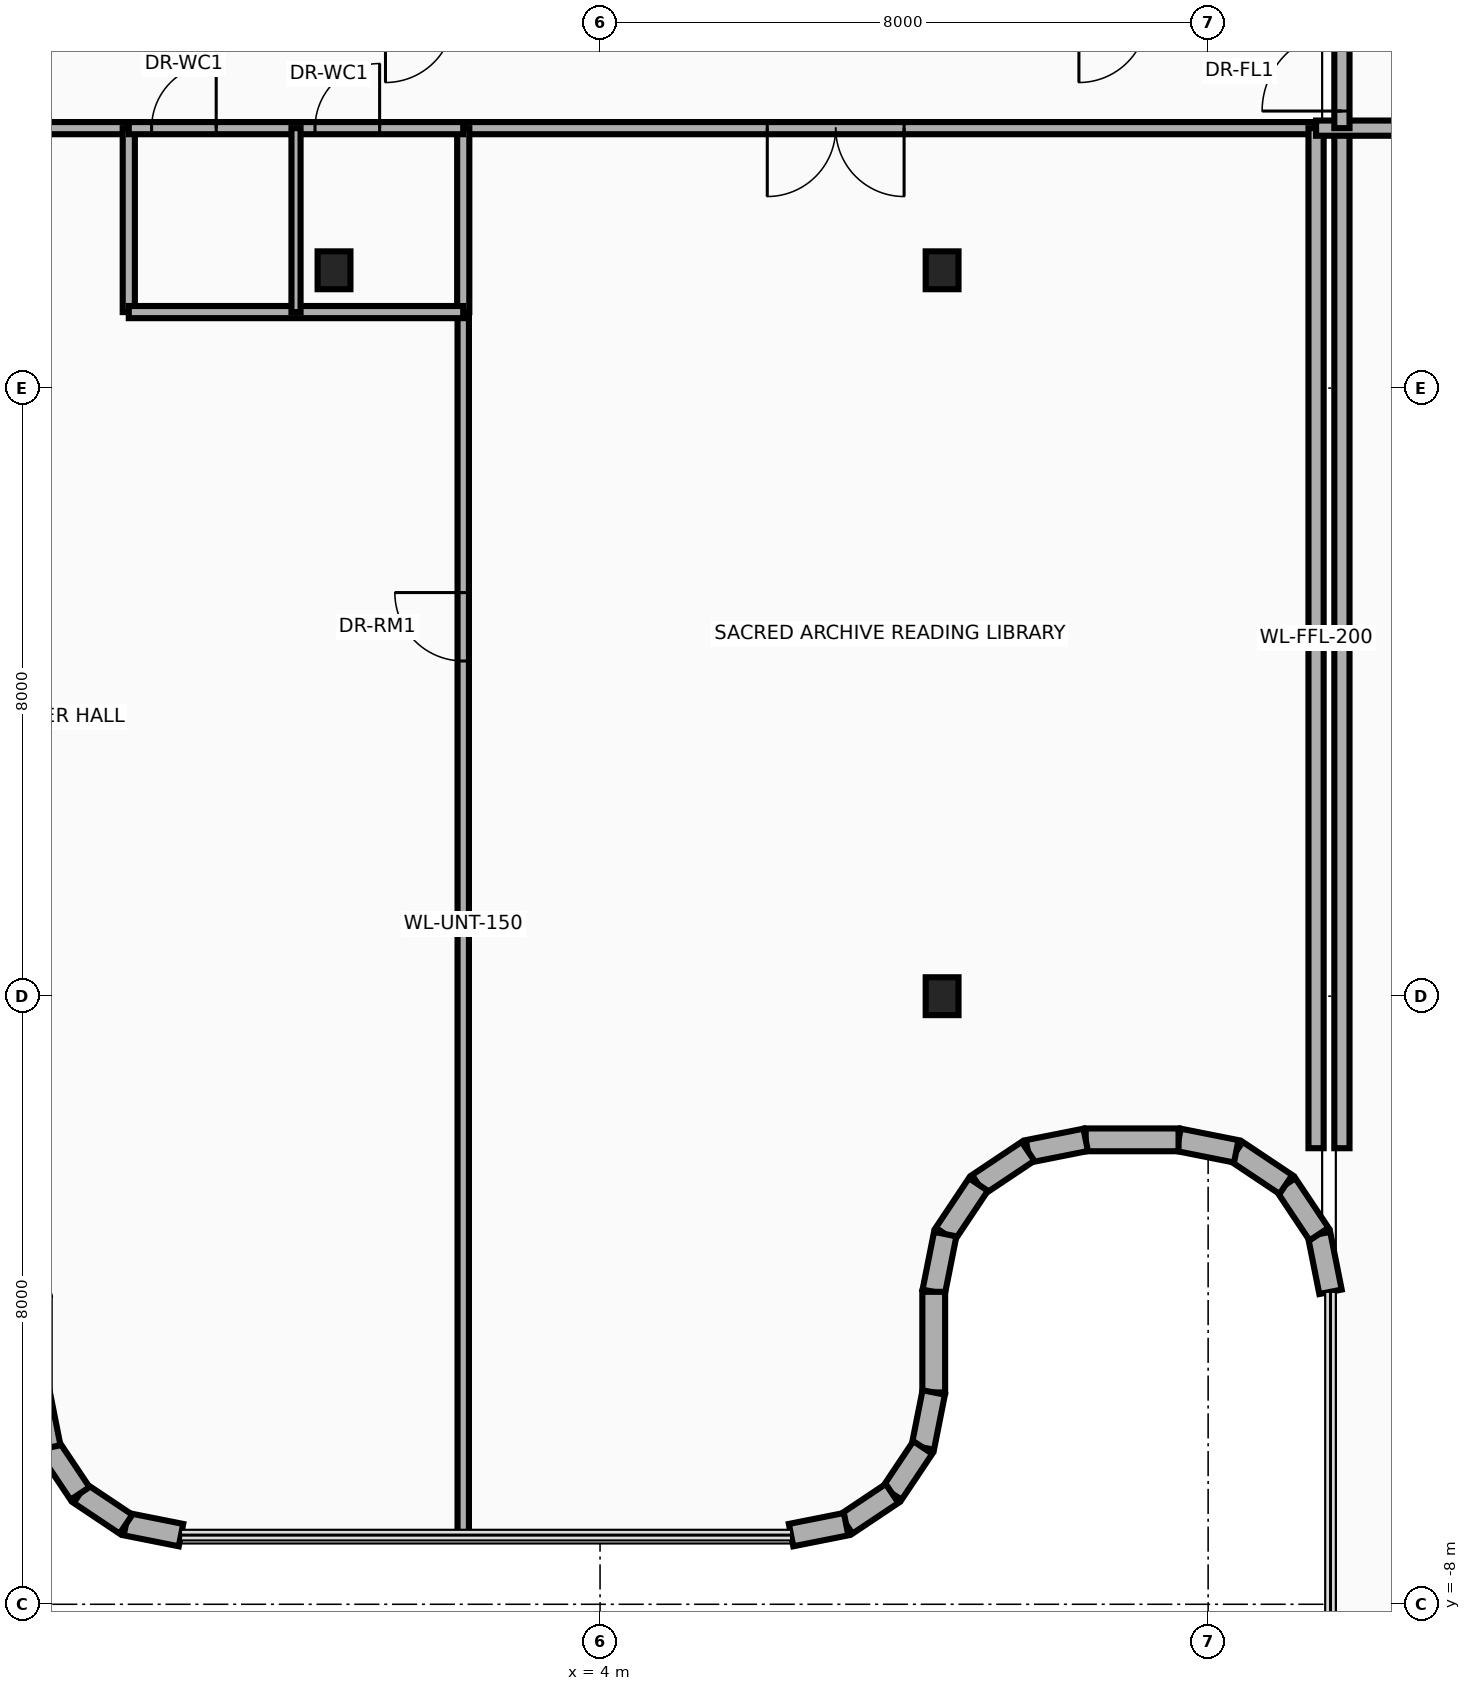
"""IFC4 building model, lengths in metres.
Left out: names, types, materials, properties, quantities, classifications, styles, units other than length and angle.
Written with IfcOpenShell. Run it as: python <this file> out.ifc"""

import sys

from ifc_helpers import new_model, si_unit, direction, frame, frame_2d, origin, origin_2d, place, context, subcontext, project, spatial, rectangle, i_section, extrude, source, transform, mapped, element, fill, save


model = new_model("IFC4")
c1 = context("Model", 3, precision=1e-05, world=origin(), true_north=direction((0.0, 1.0)))
c2 = subcontext(c1, "Body", "Model", "MODEL_VIEW")
j1 = project(units=[si_unit("LENGTHUNIT", "METRE"), si_unit("PLANEANGLEUNIT", "RADIAN")], contexts=[c1])
p1 = place(None, origin())
s1 = spatial("IfcSite", under=j1, at=p1, CompositionType="ELEMENT")
p2 = place(p1, origin())
s2 = spatial("IfcBuilding", under=s1, at=p2, CompositionType="ELEMENT")
p3 = place(p2, frame((0.0, 0.0, 192.35)))
s3 = spatial("IfcBuildingStorey", under=s2, at=p3, CompositionType="ELEMENT", Elevation=192.35)
m1 = source(origin(), c2, "Body", "SweptSolid", [
    extrude(i_section(OverallWidth=0.432, OverallDepth=0.498, WebThickness=0.056, FlangeThickness=0.089, at=origin_2d()), origin(), (0.0, 0.0, 1.0), 3.95),
])
for number, where, z_axis, x_axis in (
    (1, (8.5, 0.0, 0.0), (0.0, 0.0, 1.0), (1.0, 0.0, 0.0)),
    (2, (8.5, 9.55, 0.0), (0.0, 0.0, 1.0), (1.0, 0.0, 0.0)),
    (3, (0.5, 9.55, 0.0), (0.0, 0.0, 1.0), (1.0, 0.0, 0.0)),
):
    element("IfcColumn", number, at=place(p3, frame(where, z_axis=z_axis, x_axis=x_axis)), inside=s3, PredefinedType="COLUMN", context=c2, shape_type="MappedRepresentation", body=[
        mapped(m1, transform((0.0, 0.0, 0.0), x_axis=(1.0, 0.0, 0.0), y_axis=(0.0, 1.0, 0.0), z_axis=(0.0, 0.0, 1.0), scale=1.0)),
    ])
p4 = place(p3, frame((13.61, -3.889, 0.0), z_axis=(0.0, 0.0, 1.0), x_axis=(-0.195206365311, 0.98076219082, 0.0)))
e4 = element("IfcWall", 4, at=p4, inside=s3, PredefinedType="SOLIDWALL", context=c2, shape_type="SweptSolid", body=[
    extrude(rectangle(XDim=0.774, YDim=0.3, at=frame_2d((0.387, 0.0))), origin(), (0.0, 0.0, 1.0), 3.71),
])
for number, where, z_axis, x_axis in (
    (5, (13.459, -3.13, 0.0), (0.0, 0.0, 1.0), (-0.556, 0.831, 0.0)),
    (6, (13.023, -2.477, 0.0), (0.0, 0.0, 1.0), (-0.831, 0.556, 0.0)),
):
    element("IfcWall", number, at=place(p3, frame(where, z_axis=z_axis, x_axis=x_axis)), inside=s3, PredefinedType="SOLIDWALL", context=c2, shape_type="SweptSolid", body=[
        extrude(rectangle(XDim=0.785, YDim=0.3, at=frame_2d((0.393, 0.0))), origin(), (0.0, 0.0, 1.0), 3.71),
    ])
p5 = place(p3, frame((12.37, -2.041, 0.0), z_axis=(0.0, 0.0, 1.0), x_axis=(-0.98076219082, 0.195206365311, 0.0)))
e7 = element("IfcWall", 7, at=p5, inside=s3, PredefinedType="SOLIDWALL", context=c2, shape_type="SweptSolid", body=[
    extrude(rectangle(XDim=0.774, YDim=0.3, at=frame_2d((0.387, 0.0))), origin(), (0.0, 0.0, 1.0), 3.71),
])
p6 = place(p3, frame((11.611, -1.89, 0.0), z_axis=(0.0, 0.0, 1.0), x_axis=(-1.0, 0.0, 0.0)))
e8 = element("IfcWall", 8, at=p6, inside=s3, PredefinedType="SOLIDWALL", context=c2, shape_type="SweptSolid", body=[
    extrude(rectangle(XDim=1.222, YDim=0.3, at=frame_2d((0.611, 0.0))), origin(), (0.0, 0.0, 1.0), 3.71),
])
p7 = place(p3, frame((10.389, -1.89, 0.0), z_axis=(0.0, 0.0, 1.0), x_axis=(-0.98076219082, -0.195206365311, 0.0)))
e9 = element("IfcWall", 9, at=p7, inside=s3, PredefinedType="SOLIDWALL", context=c2, shape_type="SweptSolid", body=[
    extrude(rectangle(XDim=0.774, YDim=0.3, at=frame_2d((0.387, 0.0))), origin(), (0.0, 0.0, 1.0), 3.71),
])
for number, where, z_axis, x_axis in (
    (10, (9.63, -2.041, 0.0), (0.0, 0.0, 1.0), (-0.831, -0.556, 0.0)),
    (11, (8.977, -2.477, 0.0), (0.0, 0.0, 1.0), (-0.556, -0.831, 0.0)),
):
    element("IfcWall", number, at=place(p3, frame(where, z_axis=z_axis, x_axis=x_axis)), inside=s3, PredefinedType="SOLIDWALL", context=c2, shape_type="SweptSolid", body=[
        extrude(rectangle(XDim=0.785, YDim=0.3, at=frame_2d((0.393, 0.0))), origin(), (0.0, 0.0, 1.0), 2.695),
    ])
p8 = place(p3, frame((8.541, -3.13, 0.0), z_axis=(0.0, 0.0, 1.0), x_axis=(-0.195206365311, -0.98076219082, 0.0)))
e12 = element("IfcWall", 12, at=p8, inside=s3, PredefinedType="SOLIDWALL", context=c2, shape_type="SweptSolid", body=[
    extrude(rectangle(XDim=0.774, YDim=0.3, at=frame_2d((0.387, 0.0))), origin(), (0.0, 0.0, 1.0), 2.695),
])
p9 = place(p3, frame((8.39, -3.889, 0.0), z_axis=(0.0, 0.0, 1.0), x_axis=(0.0, -1.0, 0.0)))
e13 = element("IfcWall", 13, at=p9, inside=s3, PredefinedType="SOLIDWALL", context=c2, shape_type="SweptSolid", body=[
    extrude(rectangle(XDim=1.324, YDim=0.3, at=frame_2d((0.662, 0.0))), origin(), (0.0, 0.0, 1.0), 2.695),
])
p10 = place(p3, frame((8.39, -5.213, 0.0), z_axis=(0.0, 0.0, 1.0), x_axis=(-0.194780446724, -0.980846867546, 0.0)))
e14 = element("IfcWall", 14, at=p10, inside=s3, PredefinedType="SOLIDWALL", context=c2, shape_type="SweptSolid", body=[
    extrude(rectangle(XDim=0.738, YDim=0.3, at=frame_2d((0.369, 0.0))), origin(), (0.0, 0.0, 1.0), 2.695),
])
p11 = place(p3, frame((8.246, -5.937, 0.0), z_axis=(0.0, 0.0, 1.0), x_axis=(-0.555784030735, -0.83132671747, 0.0)))
e15 = element("IfcWall", 15, at=p11, inside=s3, PredefinedType="SOLIDWALL", context=c2, shape_type="SweptSolid", body=[
    extrude(rectangle(XDim=0.728, YDim=0.3, at=frame_2d((0.364, 0.0))), origin(), (0.0, 0.0, 1.0), 2.695),
])
p12 = place(p3, frame((7.842, -6.542, 0.0), z_axis=(0.0, 0.0, 1.0), x_axis=(-0.831378135196, -0.555707113792, 0.0)))
e16 = element("IfcWall", 16, at=p12, inside=s3, PredefinedType="SOLIDWALL", context=c2, shape_type="SweptSolid", body=[
    extrude(rectangle(XDim=0.727, YDim=0.3, at=frame_2d((0.364, 0.0))), origin(), (0.0, 0.0, 1.0), 3.71),
])
for number, where, z_axis, x_axis in (
    (17, (7.237, -6.946, 0.0), (0.0, 0.0, 1.0), (-0.981, -0.195, 0.0)),
    (18, (-1.513, -7.09, 0.0), (0.0, 0.0, 1.0), (-0.981, 0.195, 0.0)),
):
    element("IfcWall", number, at=place(p3, frame(where, z_axis=z_axis, x_axis=x_axis)), inside=s3, PredefinedType="SOLIDWALL", context=c2, shape_type="SweptSolid", body=[
        extrude(rectangle(XDim=0.738, YDim=0.3, at=frame_2d((0.369, 0.0))), origin(), (0.0, 0.0, 1.0), 3.156),
    ])
p13 = place(p3, frame((-2.237, -6.946, 0.0), z_axis=(0.0, 0.0, 1.0), x_axis=(-0.831378135196, 0.555707113792, 0.0)))
e19 = element("IfcWall", 19, at=p13, inside=s3, PredefinedType="SOLIDWALL", context=c2, shape_type="SweptSolid", body=[
    extrude(rectangle(XDim=0.727, YDim=0.3, at=frame_2d((0.364, 0.0))), origin(), (0.0, 0.0, 1.0), 3.71),
])
p14 = place(p3, frame((-2.842, -6.542, 0.0), z_axis=(0.0, 0.0, 1.0), x_axis=(-0.555784030735, 0.83132671747, 0.0)))
e20 = element("IfcWall", 20, at=p14, inside=s3, PredefinedType="SOLIDWALL", context=c2, shape_type="SweptSolid", body=[
    extrude(rectangle(XDim=0.728, YDim=0.3, at=frame_2d((0.364, 0.0))), origin(), (0.0, 0.0, 1.0), 2.695),
])
p15 = place(p3, frame((-3.246, -5.937, 0.0), z_axis=(0.0, 0.0, 1.0), x_axis=(-0.194780446724, 0.980846867546, 0.0)))
e21 = element("IfcWall", 21, at=p15, inside=s3, PredefinedType="SOLIDWALL", context=c2, shape_type="SweptSolid", body=[
    extrude(rectangle(XDim=0.738, YDim=0.3, at=frame_2d((0.369, 0.0))), origin(), (0.0, 0.0, 1.0), 2.695),
])
p16 = place(p3, frame((-10.05, 11.42, 0.0), z_axis=(0.0, 0.0, 1.0), x_axis=(1.0, 0.0, 0.0)))
e22 = element("IfcWall", 22, at=p16, inside=s3, PredefinedType="PARTITIONING", context=c2, shape_type="SweptSolid", body=[
    extrude(rectangle(XDim=7.85, YDim=0.16, at=frame_2d((3.925, 0.0))), origin(), (0.0, 0.0, 1.0), 2.695),
])
p17 = place(p3, frame((2.2, 11.42, 0.0), z_axis=(0.0, 0.0, 1.0), x_axis=(1.0, 0.0, 0.0)))
e23 = element("IfcWall", 23, at=p17, inside=s3, PredefinedType="PARTITIONING", context=c2, shape_type="SweptSolid", body=[
    extrude(rectangle(XDim=11.22, YDim=0.16, at=frame_2d((5.61, 0.0))), origin(), (0.0, 0.0, 1.0), 2.695),
])
p18 = place(p17, frame((4.0, 0.0, 0.0)))
e24 = element("IfcOpeningElement", 24, at=p18, cuts=e23, PredefinedType="OPENING", context=c2, shape_type="SweptSolid", body=[
    extrude(rectangle(XDim=1.8, YDim=2.15, at=frame_2d((0.9, 1.075))), frame((0.0, 0.095, 0.0), z_axis=(0.0, -1.0, 0.0), x_axis=(1.0, 0.0, 0.0)), (0.0, 0.0, 1.0), 0.19),
])
for number, where, z_axis, x_axis in (
    (25, (13.42, -2.0, 0.0), (0.0, 0.0, 1.0), (0.0, 1.0, 0.0)),
    (26, (13.76, -2.0, 0.0), (0.0, 0.0, 1.0), (0.0, 1.0, 0.0)),
):
    element("IfcWall", number, at=place(p3, frame(where, z_axis=z_axis, x_axis=x_axis)), inside=s3, PredefinedType="PARTITIONING", context=c2, shape_type="SweptSolid", body=[
        extrude(rectangle(XDim=13.42, YDim=0.2, at=frame_2d((6.71, 0.0))), origin(), (0.0, 0.0, 1.0), 2.994),
    ])
p19 = place(p3, frame((2.2, -7.09, 0.0), z_axis=(0.0, 0.0, 1.0), x_axis=(0.0, 1.0, 0.0)))
e27 = element("IfcWall", 27, at=p19, inside=s3, PredefinedType="PARTITIONING", context=c2, shape_type="SweptSolid", body=[
    extrude(rectangle(XDim=16.09, YDim=0.15, at=frame_2d((8.045, 0.0))), origin(), (0.0, 0.0, 1.0), 2.994),
])
p20 = place(p19, frame((11.5, 0.0, 0.0)))
e28 = element("IfcOpeningElement", 28, at=p20, cuts=e27, PredefinedType="OPENING", context=c2, shape_type="SweptSolid", body=[
    extrude(rectangle(XDim=0.9, YDim=2.1, at=frame_2d((0.45, 1.05))), frame((0.0, 0.09, 0.0), z_axis=(0.0, -1.0, 0.0), x_axis=(1.0, 0.0, 0.0)), (0.0, 0.0, 1.0), 0.18),
])
for number, where, z_axis, x_axis in (
    (29, (-2.2, 9.0, 0.0), (0.0, 0.0, 1.0), (0.0, 1.0, 0.0)),
    (30, (2.2, 9.0, 0.0), (0.0, 0.0, 1.0), (0.0, 1.0, 0.0)),
):
    element("IfcWall", number, at=place(p3, frame(where, z_axis=z_axis, x_axis=x_axis)), inside=s3, PredefinedType="PARTITIONING", context=c2, shape_type="SweptSolid", body=[
        extrude(rectangle(XDim=2.42, YDim=0.16, at=frame_2d((1.21, 0.0))), origin(), (0.0, 0.0, 1.0), 2.994),
    ])
p21 = place(p3, frame((-2.2, 9.0, 0.0), z_axis=(0.0, 0.0, 1.0), x_axis=(1.0, 0.0, 0.0)))
e31 = element("IfcWall", 31, at=p21, inside=s3, PredefinedType="PARTITIONING", context=c2, shape_type="SweptSolid", body=[
    extrude(rectangle(XDim=4.4, YDim=0.16, at=frame_2d((2.2, 0.0))), origin(), (0.0, 0.0, 1.0), 3.71),
])
p22 = place(p3, frame((-2.2, 11.42, 0.0), z_axis=(0.0, 0.0, 1.0), x_axis=(1.0, 0.0, 0.0)))
e32 = element("IfcWall", 32, at=p22, inside=s3, PredefinedType="PARTITIONING", context=c2, shape_type="SweptSolid", body=[
    extrude(rectangle(XDim=4.4, YDim=0.16, at=frame_2d((2.2, 0.0))), origin(), (0.0, 0.0, 1.0), 3.156),
])
p23 = place(p22, frame((0.3, 0.0, 0.0)))
e33 = element("IfcOpeningElement", 33, at=p23, cuts=e32, PredefinedType="OPENING", context=c2, shape_type="SweptSolid", body=[
    extrude(rectangle(XDim=0.85, YDim=2.1, at=frame_2d((0.425, 1.05))), frame((0.0, 0.095, 0.0), z_axis=(0.0, -1.0, 0.0), x_axis=(1.0, 0.0, 0.0)), (0.0, 0.0, 1.0), 0.19),
])
p24 = place(p22, frame((2.45, 0.0, 0.0)))
e34 = element("IfcOpeningElement", 34, at=p24, cuts=e32, PredefinedType="OPENING", context=c2, shape_type="SweptSolid", body=[
    extrude(rectangle(XDim=0.85, YDim=2.1, at=frame_2d((0.425, 1.05))), frame((0.0, 0.095, 0.0), z_axis=(0.0, -1.0, 0.0), x_axis=(1.0, 0.0, 0.0)), (0.0, 0.0, 1.0), 0.19),
])
p25 = place(p3, frame((0.0, 9.0, 0.0), z_axis=(0.0, 0.0, 1.0), x_axis=(0.0, 1.0, 0.0)))
e35 = element("IfcWall", 35, at=p25, inside=s3, PredefinedType="PARTITIONING", context=c2, shape_type="SweptSolid", body=[
    extrude(rectangle(XDim=2.42, YDim=0.12, at=frame_2d((1.21, 0.0))), origin(), (0.0, 0.0, 1.0), 2.994),
])
p26 = place(p3, frame((13.42, 11.42, 0.0), z_axis=(0.0, 0.0, 1.0), x_axis=(1.0, 0.0, 0.0)))
e36 = element("IfcWall", 36, at=p26, inside=s3, PredefinedType="PARTITIONING", context=c2, shape_type="SweptSolid", body=[
    extrude(rectangle(XDim=1.98, YDim=0.2, at=frame_2d((0.99, 0.0))), origin(), (0.0, 0.0, 1.0), 3.71),
])
p27 = place(p3, frame((13.76, 11.42, 0.0), z_axis=(0.0, 0.0, 1.0), x_axis=(0.0, 1.0, 0.0)))
e37 = element("IfcWall", 37, at=p27, inside=s3, PredefinedType="PARTITIONING", context=c2, shape_type="SweptSolid", body=[
    extrude(rectangle(XDim=1.5, YDim=0.2, at=frame_2d((0.75, 0.0))), origin(), (0.0, 0.0, 1.0), 3.71),
])
p28 = place(p27, frame((0.225, 0.0, 0.0)))
e38 = element("IfcOpeningElement", 38, at=p28, cuts=e37, PredefinedType="OPENING", context=c2, shape_type="SweptSolid", body=[
    extrude(rectangle(XDim=1.05, YDim=2.15, at=frame_2d((0.525, 1.075))), frame((0.0, 0.115, 0.0), z_axis=(0.0, -1.0, 0.0), x_axis=(1.0, 0.0, 0.0)), (0.0, 0.0, 1.0), 0.23),
])
p29 = place(p18, frame((1.8, 0.0, 0.0), z_axis=(0.0, 0.0, 1.0), x_axis=(-1.0, 0.0, 0.0)))
e39 = element("IfcDoor", 39, at=p29, inside=s3, OperationType="DOUBLE_DOOR_SINGLE_SWING", PredefinedType="DOOR", context=c2, shape_type="SweptSolid", body=[
    extrude(rectangle(XDim=1.8, YDim=2.15, at=frame_2d((0.9, 1.075))), frame((0.0, 0.025, 0.0), z_axis=(0.0, -1.0, 0.0), x_axis=(1.0, 0.0, 0.0)), (0.0, 0.0, 1.0), 0.05),
])
fill(e24, e39)
p30 = place(p20, origin())
e40 = element("IfcDoor", 40, at=p30, inside=s3, OperationType="SINGLE_SWING_RIGHT", PredefinedType="DOOR", context=c2, shape_type="SweptSolid", body=[
    extrude(rectangle(XDim=0.9, YDim=2.1, at=frame_2d((0.45, 1.05))), frame((0.0, 0.025, 0.0), z_axis=(0.0, -1.0, 0.0), x_axis=(1.0, 0.0, 0.0)), (0.0, 0.0, 1.0), 0.05),
])
fill(e28, e40)
p31 = place(p23, origin())
e41 = element("IfcDoor", 41, at=p31, inside=s3, OperationType="SINGLE_SWING_LEFT", PredefinedType="DOOR", context=c2, shape_type="SweptSolid", body=[
    extrude(rectangle(XDim=0.85, YDim=2.1, at=frame_2d((0.425, 1.05))), frame((0.0, 0.025, 0.0), z_axis=(0.0, -1.0, 0.0), x_axis=(1.0, 0.0, 0.0)), (0.0, 0.0, 1.0), 0.05),
])
fill(e33, e41)
p32 = place(p24, origin())
e42 = element("IfcDoor", 42, at=p32, inside=s3, OperationType="SINGLE_SWING_RIGHT", PredefinedType="DOOR", context=c2, shape_type="SweptSolid", body=[
    extrude(rectangle(XDim=0.85, YDim=2.1, at=frame_2d((0.425, 1.05))), frame((0.0, 0.025, 0.0), z_axis=(0.0, -1.0, 0.0), x_axis=(1.0, 0.0, 0.0)), (0.0, 0.0, 1.0), 0.05),
])
fill(e34, e42)
p33 = place(p28, origin())
e43 = element("IfcDoor", 43, at=p33, inside=s3, OperationType="SINGLE_SWING_RIGHT", PredefinedType="DOOR", context=c2, shape_type="SweptSolid", body=[
    extrude(rectangle(XDim=1.05, YDim=2.15, at=frame_2d((0.525, 1.075))), frame((0.0, 0.025, 0.0), z_axis=(0.0, -1.0, 0.0), x_axis=(1.0, 0.0, 0.0)), (0.0, 0.0, 1.0), 0.05),
])
fill(e38, e43)
save(model, sys.argv[1])
